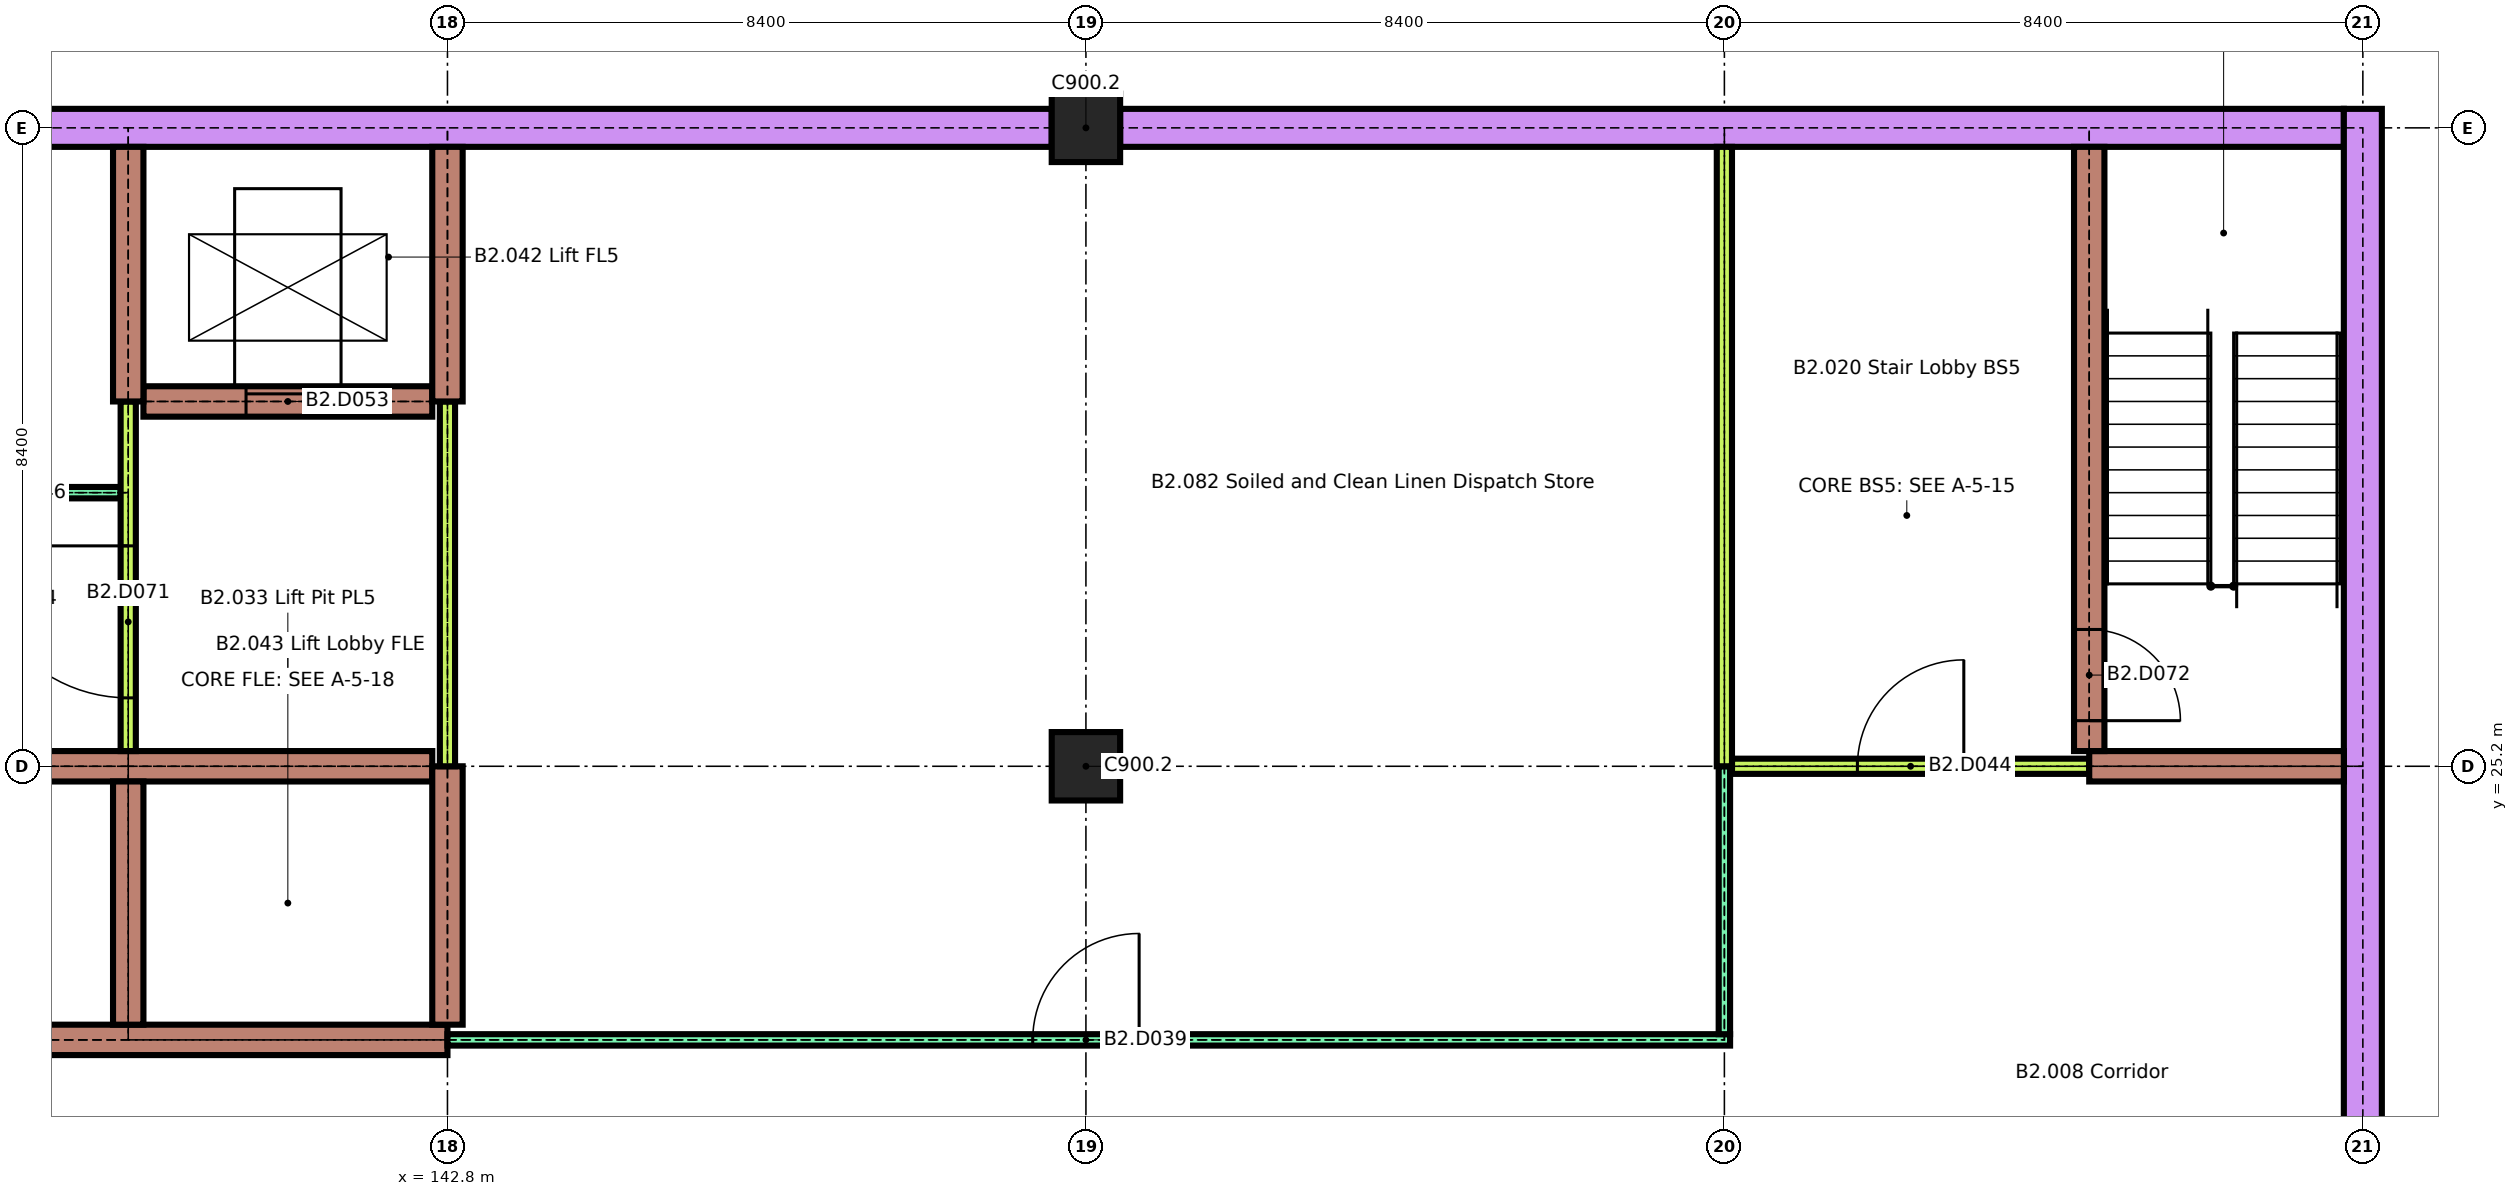
"""IFC4 building model, lengths in metres.
Left out: names, types, materials, properties, quantities, classifications, styles, units other than length and angle.
Written with IfcOpenShell. Run it as: python <this file> out.ifc"""

import sys

from ifc_helpers import new_model, si_unit, direction, frame, frame_2d, origin, origin_2d, place, context, subcontext, project, spatial, rectangle, extrude, element, fill, save


model = new_model("IFC4")
c1 = context("Model", 3, precision=1e-05, world=origin(), true_north=direction((0.0, 1.0)))
c2 = subcontext(c1, "Body", "Model", "MODEL_VIEW")
j1 = project(units=[si_unit("LENGTHUNIT", "METRE"), si_unit("PLANEANGLEUNIT", "RADIAN")], contexts=[c1])
p1 = place(None, origin())
s1 = spatial("IfcSite", under=j1, at=p1, CompositionType="ELEMENT")
p2 = place(p1, origin())
s2 = spatial("IfcBuilding", under=s1, at=p2, CompositionType="ELEMENT")
p3 = place(p2, frame((0.0, 0.0, -7.8)))
s3 = spatial("IfcBuildingStorey", under=s2, at=p3, CompositionType="ELEMENT", Elevation=-7.8)
for number, where, z_axis, x_axis in (
    (1, (151.2, 25.2, 0.0), (0.0, 0.0, 1.0), (1.0, 0.0, 0.0)),
    (2, (151.2, 33.6, 0.0), (0.0, 0.0, 1.0), (1.0, 0.0, 0.0)),
):
    element("IfcColumn", number, at=place(p3, frame(where, z_axis=z_axis, x_axis=x_axis)), inside=s3, PredefinedType="COLUMN", context=c2, shape_type="SweptSolid", body=[
        extrude(rectangle(XDim=0.9, YDim=0.9, at=origin_2d()), origin(), (0.0, 0.0, 1.0), 3.1),
    ])
p4 = place(p3, frame((134.85, 33.6, 0.0), z_axis=(0.0, 0.0, 1.0), x_axis=(1.0, 0.0, 0.0)))
e3 = element("IfcWall", 3, at=p4, inside=s3, PredefinedType="SOLIDWALL", context=c2, shape_type="SweptSolid", body=[
    extrude(rectangle(XDim=15.9, YDim=0.5, at=frame_2d((7.95, 0.0))), origin(), (0.0, 0.0, 1.0), 3.1),
])
p5 = place(p3, frame((151.65, 33.6, 0.0), z_axis=(0.0, 0.0, 1.0), x_axis=(1.0, 0.0, 0.0)))
e4 = element("IfcWall", 4, at=p5, inside=s3, PredefinedType="SOLIDWALL", context=c2, shape_type="SweptSolid", body=[
    extrude(rectangle(XDim=16.1, YDim=0.5, at=frame_2d((8.05, 0.0))), origin(), (0.0, 0.0, 1.0), 3.1),
])
p6 = place(p3, frame((168.0, 17.25, 0.0), z_axis=(0.0, 0.0, 1.0), x_axis=(0.0, 1.0, 0.0)))
e5 = element("IfcWall", 5, at=p6, inside=s3, PredefinedType="SOLIDWALL", context=c2, shape_type="SweptSolid", body=[
    extrude(rectangle(XDim=16.6, YDim=0.5, at=frame_2d((8.3, 0.0))), origin(), (0.0, 0.0, 1.0), 3.1),
])
p7 = place(p3, frame((117.8, 21.6, 0.0), z_axis=(0.0, 0.0, 1.0), x_axis=(1.0, 0.0, 0.0)))
e6 = element("IfcWall", 6, at=p7, inside=s3, PredefinedType="SHEAR", context=c2, shape_type="SweptSolid", body=[
    extrude(rectangle(XDim=25.0, YDim=0.4, at=frame_2d((12.5, 0.0))), origin(), (0.0, 0.0, 1.0), 3.1),
])
p8 = place(p7, frame((1.45, 0.0, 0.0)))
e7 = element("IfcOpeningElement", 7, at=p8, cuts=e6, PredefinedType="OPENING", context=c2, shape_type="SweptSolid", body=[
    extrude(rectangle(XDim=1.1, YDim=2.1, at=frame_2d((0.55, 1.05))), frame((0.0, 0.21, 0.0), z_axis=(0.0, -1.0, 0.0), x_axis=(1.0, 0.0, 0.0)), (0.0, 0.0, 1.0), 0.42),
])
p9 = place(p7, frame((5.55, 0.0, 0.0)))
e8 = element("IfcOpeningElement", 8, at=p9, cuts=e6, PredefinedType="OPENING", context=c2, shape_type="SweptSolid", body=[
    extrude(rectangle(XDim=1.1, YDim=2.1, at=frame_2d((0.55, 1.05))), frame((0.0, 0.21, 0.0), z_axis=(0.0, -1.0, 0.0), x_axis=(1.0, 0.0, 0.0)), (0.0, 0.0, 1.0), 0.42),
])
p10 = place(p3, frame((142.8, 21.6, 0.0), z_axis=(0.0, 0.0, 1.0), x_axis=(1.0, 0.0, 0.0)))
e9 = element("IfcWall", 9, at=p10, inside=s3, PredefinedType="PARTITIONING", context=c2, shape_type="SweptSolid", body=[
    extrude(rectangle(XDim=16.875, YDim=0.15, at=frame_2d((8.438, 0.0))), origin(), (0.0, 0.0, 1.0), 3.1),
])
p11 = place(p10, frame((7.7, 0.0, 0.0)))
e10 = element("IfcOpeningElement", 10, at=p11, cuts=e9, PredefinedType="OPENING", context=c2, shape_type="SweptSolid", body=[
    extrude(rectangle(XDim=1.4, YDim=2.1, at=frame_2d((0.7, 1.05))), frame((0.0, 0.085, 0.0), z_axis=(0.0, -1.0, 0.0), x_axis=(1.0, 0.0, 0.0)), (0.0, 0.0, 1.0), 0.17),
])
p12 = place(p3, frame((117.8, 25.2, 0.0), z_axis=(0.0, 0.0, 1.0), x_axis=(1.0, 0.0, 0.0)))
e11 = element("IfcWall", 11, at=p12, inside=s3, PredefinedType="SHEAR", context=c2, shape_type="SweptSolid", body=[
    extrude(rectangle(XDim=24.8, YDim=0.4, at=frame_2d((12.4, 0.0))), origin(), (0.0, 0.0, 1.0), 3.1),
])
p13 = place(p3, frame((159.7, 25.2, 0.0), z_axis=(0.0, 0.0, 1.0), x_axis=(1.0, 0.0, 0.0)))
e12 = element("IfcWall", 12, at=p13, inside=s3, PredefinedType="PARTITIONING", context=c2, shape_type="SweptSolid", body=[
    extrude(rectangle(XDim=4.7, YDim=0.2, at=frame_2d((2.35, 0.0))), origin(), (0.0, 0.0, 1.0), 3.1),
])
p14 = place(p13, frame((1.65, 0.0, 0.0)))
e13 = element("IfcOpeningElement", 13, at=p14, cuts=e12, PredefinedType="OPENING", context=c2, shape_type="SweptSolid", body=[
    extrude(rectangle(XDim=1.4, YDim=2.1, at=frame_2d((0.7, 1.05))), frame((0.0, 0.11, 0.0), z_axis=(0.0, -1.0, 0.0), x_axis=(1.0, 0.0, 0.0)), (0.0, 0.0, 1.0), 0.22),
])
p15 = place(p3, frame((164.4, 25.2, 0.0), z_axis=(0.0, 0.0, 1.0), x_axis=(1.0, 0.0, 0.0)))
e14 = element("IfcWall", 14, at=p15, inside=s3, PredefinedType="SHEAR", context=c2, shape_type="SweptSolid", body=[
    extrude(rectangle(XDim=3.35, YDim=0.4, at=frame_2d((1.675, 0.0))), origin(), (0.0, 0.0, 1.0), 3.1),
])
p16 = place(p3, frame((126.1, 28.8, 0.0), z_axis=(0.0, 0.0, 1.0), x_axis=(1.0, 0.0, 0.0)))
e15 = element("IfcWall", 15, at=p16, inside=s3, PredefinedType="PARTITIONING", context=c2, shape_type="SweptSolid", body=[
    extrude(rectangle(XDim=12.4, YDim=0.15, at=frame_2d((6.2, 0.0))), origin(), (0.0, 0.0, 1.0), 3.1),
])
p17 = place(p16, frame((3.45, 0.0, 0.0)))
e16 = element("IfcOpeningElement", 16, at=p17, cuts=e15, PredefinedType="OPENING", context=c2, shape_type="SweptSolid", body=[
    extrude(rectangle(XDim=1.4, YDim=2.1, at=frame_2d((0.7, 1.05))), frame((0.0, 0.085, 0.0), z_axis=(0.0, -1.0, 0.0), x_axis=(1.0, 0.0, 0.0)), (0.0, 0.0, 1.0), 0.17),
])
p18 = place(p16, frame((9.65, 0.0, 0.0)))
e17 = element("IfcOpeningElement", 17, at=p18, cuts=e15, PredefinedType="OPENING", context=c2, shape_type="SweptSolid", body=[
    extrude(rectangle(XDim=1.4, YDim=2.1, at=frame_2d((0.7, 1.05))), frame((0.0, 0.085, 0.0), z_axis=(0.0, -1.0, 0.0), x_axis=(1.0, 0.0, 0.0)), (0.0, 0.0, 1.0), 0.17),
])
p19 = place(p3, frame((138.8, 30.0, 0.0), z_axis=(0.0, 0.0, 1.0), x_axis=(1.0, 0.0, 0.0)))
e18 = element("IfcWall", 18, at=p19, inside=s3, PredefinedType="SHEAR", context=c2, shape_type="SweptSolid", body=[
    extrude(rectangle(XDim=3.8, YDim=0.4, at=frame_2d((1.9, 0.0))), origin(), (0.0, 0.0, 1.0), 3.1),
])
p20 = place(p19, frame((1.35, 0.0, 0.0)))
e19 = element("IfcOpeningElement", 19, at=p20, cuts=e18, PredefinedType="OPENING", context=c2, shape_type="SweptSolid", body=[
    extrude(rectangle(XDim=1.1, YDim=2.1, at=frame_2d((0.55, 1.05))), frame((0.0, 0.21, 0.0), z_axis=(0.0, -1.0, 0.0), x_axis=(1.0, 0.0, 0.0)), (0.0, 0.0, 1.0), 0.42),
])
p21 = place(p3, frame((138.6, 21.8, 0.0), z_axis=(0.0, 0.0, 1.0), x_axis=(0.0, 1.0, 0.0)))
e20 = element("IfcWall", 20, at=p21, inside=s3, PredefinedType="SHEAR", context=c2, shape_type="SweptSolid", body=[
    extrude(rectangle(XDim=3.2, YDim=0.4, at=frame_2d((1.6, 0.0))), origin(), (0.0, 0.0, 1.0), 3.1),
])
p22 = place(p3, frame((138.6, 25.4, 0.0), z_axis=(0.0, 0.0, 1.0), x_axis=(0.0, 1.0, 0.0)))
e21 = element("IfcWall", 21, at=p22, inside=s3, PredefinedType="PARTITIONING", context=c2, shape_type="SweptSolid", body=[
    extrude(rectangle(XDim=4.6, YDim=0.2, at=frame_2d((2.3, 0.0))), origin(), (0.0, 0.0, 1.0), 3.1),
])
p23 = place(p22, frame((0.7, 0.0, 0.0)))
e22 = element("IfcOpeningElement", 22, at=p23, cuts=e21, PredefinedType="OPENING", context=c2, shape_type="SweptSolid", body=[
    extrude(rectangle(XDim=2.0, YDim=2.4, at=frame_2d((1.0, 1.2))), frame((0.0, 0.11, 0.0), z_axis=(0.0, -1.0, 0.0), x_axis=(1.0, 0.0, 0.0)), (0.0, 0.0, 1.0), 0.22),
])
p24 = place(p3, frame((138.6, 30.0, 0.0), z_axis=(0.0, 0.0, 1.0), x_axis=(0.0, 1.0, 0.0)))
e23 = element("IfcWall", 23, at=p24, inside=s3, PredefinedType="SHEAR", context=c2, shape_type="SweptSolid", body=[
    extrude(rectangle(XDim=3.35, YDim=0.4, at=frame_2d((1.675, 0.0))), origin(), (0.0, 0.0, 1.0), 3.1),
])
p25 = place(p3, frame((142.8, 21.8, 0.0), z_axis=(0.0, 0.0, 1.0), x_axis=(0.0, 1.0, 0.0)))
e24 = element("IfcWall", 24, at=p25, inside=s3, PredefinedType="SHEAR", context=c2, shape_type="SweptSolid", body=[
    extrude(rectangle(XDim=3.4, YDim=0.4, at=frame_2d((1.7, 0.0))), origin(), (0.0, 0.0, 1.0), 3.1),
])
p26 = place(p3, frame((142.8, 25.2, 0.0), z_axis=(0.0, 0.0, 1.0), x_axis=(0.0, 1.0, 0.0)))
e25 = element("IfcWall", 25, at=p26, inside=s3, PredefinedType="PARTITIONING", context=c2, shape_type="SweptSolid", body=[
    extrude(rectangle(XDim=4.8, YDim=0.2, at=frame_2d((2.4, 0.0))), origin(), (0.0, 0.0, 1.0), 3.1),
])
p27 = place(p3, frame((142.8, 30.0, 0.0), z_axis=(0.0, 0.0, 1.0), x_axis=(0.0, 1.0, 0.0)))
e26 = element("IfcWall", 26, at=p27, inside=s3, PredefinedType="SHEAR", context=c2, shape_type="SweptSolid", body=[
    extrude(rectangle(XDim=3.35, YDim=0.4, at=frame_2d((1.675, 0.0))), origin(), (0.0, 0.0, 1.0), 3.1),
])
p28 = place(p3, frame((159.6, 21.675, 0.0), z_axis=(0.0, 0.0, 1.0), x_axis=(0.0, 1.0, 0.0)))
e27 = element("IfcWall", 27, at=p28, inside=s3, PredefinedType="PARTITIONING", context=c2, shape_type="SweptSolid", body=[
    extrude(rectangle(XDim=3.525, YDim=0.15, at=frame_2d((1.762, 0.0))), origin(), (0.0, 0.0, 1.0), 3.1),
])
p29 = place(p3, frame((159.6, 25.2, 0.0), z_axis=(0.0, 0.0, 1.0), x_axis=(0.0, 1.0, 0.0)))
e28 = element("IfcWall", 28, at=p29, inside=s3, PredefinedType="PARTITIONING", context=c2, shape_type="SweptSolid", body=[
    extrude(rectangle(XDim=8.15, YDim=0.2, at=frame_2d((4.075, 0.0))), origin(), (0.0, 0.0, 1.0), 3.1),
])
p30 = place(p3, frame((164.4, 25.4, 0.0), z_axis=(0.0, 0.0, 1.0), x_axis=(0.0, 1.0, 0.0)))
e29 = element("IfcWall", 29, at=p30, inside=s3, PredefinedType="SHEAR", context=c2, shape_type="SweptSolid", body=[
    extrude(rectangle(XDim=7.95, YDim=0.4, at=frame_2d((3.975, 0.0))), origin(), (0.0, 0.0, 1.0), 3.1),
])
p31 = place(p30, frame((0.4, 0.0, 0.0)))
e30 = element("IfcOpeningElement", 30, at=p31, cuts=e29, PredefinedType="OPENING", context=c2, shape_type="SweptSolid", body=[
    extrude(rectangle(XDim=1.2, YDim=2.1, at=frame_2d((0.6, 1.05))), frame((0.0, 0.21, 0.0), z_axis=(0.0, -1.0, 0.0), x_axis=(1.0, 0.0, 0.0)), (0.0, 0.0, 1.0), 0.42),
])
p32 = place(p11, origin())
e31 = element("IfcDoor", 31, at=p32, inside=s3, OperationType="SINGLE_SWING_LEFT", PredefinedType="DOOR", context=c2, shape_type="SweptSolid", body=[
    extrude(rectangle(XDim=1.4, YDim=2.1, at=frame_2d((0.7, 1.05))), frame((0.0, 0.025, 0.0), z_axis=(0.0, -1.0, 0.0), x_axis=(1.0, 0.0, 0.0)), (0.0, 0.0, 1.0), 0.05),
])
fill(e10, e31)
p33 = place(p14, origin())
e32 = element("IfcDoor", 32, at=p33, inside=s3, OperationType="SINGLE_SWING_LEFT", PredefinedType="DOOR", context=c2, shape_type="SweptSolid", body=[
    extrude(rectangle(XDim=1.4, YDim=2.1, at=frame_2d((0.7, 1.05))), frame((0.0, 0.03, 0.0), z_axis=(0.0, -1.0, 0.0), x_axis=(1.0, 0.0, 0.0)), (0.0, 0.0, 1.0), 0.06),
])
fill(e13, e32)
p34 = place(p20, origin())
e33 = element("IfcDoor", 33, at=p34, inside=s3, OperationType="SLIDING_TO_LEFT", PredefinedType="DOOR", context=c2, shape_type="SweptSolid", body=[
    extrude(rectangle(XDim=1.1, YDim=2.1, at=frame_2d((0.55, 1.05))), frame((0.0, 0.025, 0.0), z_axis=(0.0, -1.0, 0.0), x_axis=(1.0, 0.0, 0.0)), (0.0, 0.0, 1.0), 0.05),
])
fill(e19, e33)
p35 = place(p23, origin())
e34 = element("IfcDoor", 34, at=p35, inside=s3, OperationType="SINGLE_SWING_LEFT", PredefinedType="DOOR", context=c2, shape_type="SweptSolid", body=[
    extrude(rectangle(XDim=2.0, YDim=2.4, at=frame_2d((1.0, 1.2))), frame((0.0, 0.03, 0.0), z_axis=(0.0, -1.0, 0.0), x_axis=(1.0, 0.0, 0.0)), (0.0, 0.0, 1.0), 0.06),
])
fill(e22, e34)
p36 = place(p31, origin())
e35 = element("IfcDoor", 35, at=p36, inside=s3, OperationType="SINGLE_SWING_LEFT", PredefinedType="DOOR", context=c2, shape_type="SweptSolid", body=[
    extrude(rectangle(XDim=1.2, YDim=2.1, at=frame_2d((0.6, 1.05))), frame((0.0, 0.025, 0.0), z_axis=(0.0, -1.0, 0.0), x_axis=(1.0, 0.0, 0.0)), (0.0, 0.0, 1.0), 0.05),
])
fill(e30, e35)
save(model, sys.argv[1])
